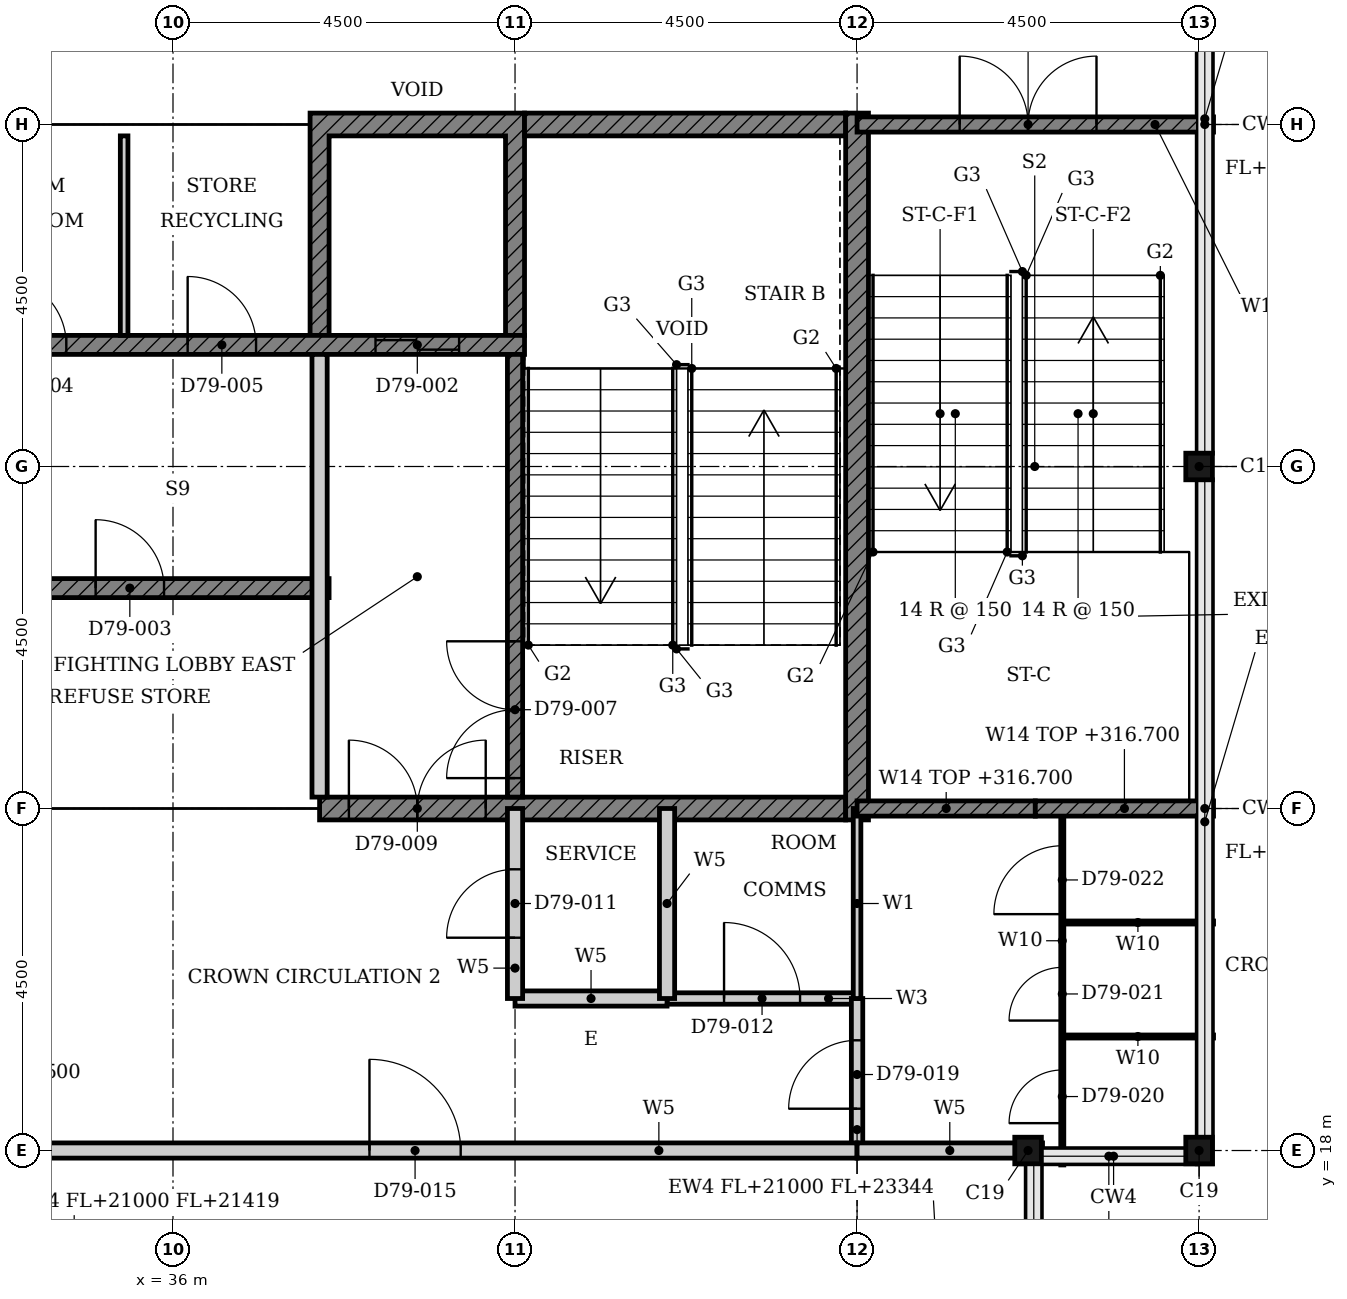
"""IFC4 building model, lengths in metres.
Left out: names, types, materials, properties, quantities, classifications, styles, units other than length and angle.
Written with IfcOpenShell. Run it as: python <this file> out.ifc"""

import sys

from ifc_helpers import new_model, si_unit, direction, frame, frame_2d, origin, origin_2d, place, context, subcontext, project, spatial, polyline, rectangle, i_section, outline, extrude, element, fill, save


model = new_model("IFC4")
c1 = context("Model", 3, precision=1e-05, world=origin(), true_north=direction((0.0, 1.0)))
c2 = subcontext(c1, "Body", "Model", "MODEL_VIEW")
j1 = project(units=[si_unit("LENGTHUNIT", "METRE"), si_unit("PLANEANGLEUNIT", "RADIAN")], contexts=[c1])
p1 = place(None, origin())
s1 = spatial("IfcSite", under=j1, at=p1, CompositionType="ELEMENT")
p2 = place(p1, origin())
s2 = spatial("IfcBuilding", under=s1, at=p2, CompositionType="ELEMENT")
p3 = place(p2, frame((0.0, 0.0, 312.8)))
s3 = spatial("IfcBuildingStorey", under=s2, at=p3, CompositionType="ELEMENT", Elevation=312.8)
for number, where, z_axis, x_axis in (
    (1, (47.25, 18.0, 0.0), (0.0, 0.0, 1.0), (1.0, 0.0, 0.0)),
    (2, (49.5, 18.0, 0.0), (0.0, 0.0, 1.0), (1.0, 0.0, 0.0)),
    (3, (49.5, 27.0, 0.0), (0.0, 0.0, 1.0), (1.0, 0.0, 0.0)),
):
    element("IfcColumn", number, at=place(p3, frame(where, z_axis=z_axis, x_axis=x_axis)), inside=s3, PredefinedType="COLUMN", context=c2, shape_type="SweptSolid", body=[
        extrude(i_section(OverallWidth=0.35, OverallDepth=0.35, WebThickness=0.012, FlangeThickness=0.019, FilletRadius=0.013, at=origin_2d()), origin(), (0.0, 0.0, 1.0), 4.2),
    ])
p4 = place(p3, frame((47.325, 15.575, 21.0), z_axis=(0.0, 0.0, 1.0), x_axis=(0.0, 1.0, 0.0)))
e4 = element("IfcWall", 4, at=p4, inside=s3, PredefinedType="SOLIDWALL", context=c2, shape_type="SweptSolid", body=[
    extrude(rectangle(XDim=2.25, YDim=0.2, at=frame_2d((1.125, 0.0))), origin(), (0.0, 0.0, 1.0), 2.864),
])
p5 = place(p3, frame((47.15, 17.925, 21.0), z_axis=(0.0, 0.0, 1.0), x_axis=(1.0, 0.0, 0.0)))
e5 = element("IfcWall", 5, at=p5, inside=s3, PredefinedType="SOLIDWALL", context=c2, shape_type="SweptSolid", body=[
    extrude(rectangle(XDim=2.325, YDim=0.2, at=frame_2d((1.163, 0.0))), origin(), (0.0, 0.0, 1.0), 2.806),
])
p6 = place(p3, frame((49.575, 17.825, 21.0), z_axis=(0.0, 0.0, 1.0), x_axis=(0.0, 1.0, 0.0)))
e6 = element("IfcWall", 6, at=p6, inside=s3, PredefinedType="SOLIDWALL", context=c2, shape_type="SweptSolid", body=[
    extrude(rectangle(XDim=9.0, YDim=0.2, at=frame_2d((4.5, 0.0))), origin(), (0.0, 0.0, 1.0), 3.342),
])
p7 = place(p3, frame((49.575, 27.175, 21.0), z_axis=(0.0, 0.0, 1.0), x_axis=(0.0, 1.0, 0.0)))
e7 = element("IfcWall", 7, at=p7, inside=s3, PredefinedType="SOLIDWALL", context=c2, shape_type="SweptSolid", body=[
    extrude(rectangle(XDim=8.8, YDim=0.2, at=frame_2d((4.4, 0.0))), origin(), (0.0, 0.0, 1.0), 3.342),
])
p8 = place(p3, origin())
e8 = element("IfcWall", 8, at=p8, inside=s3, PredefinedType="SHEAR", context=c2, shape_type="SweptSolid", body=[
    extrude(outline(polyline([(37.803, 28.725), (38.053, 28.725), (38.053, 31.35), (40.375, 31.35), (40.375, 28.725), (40.625, 28.725), (40.625, 31.65), (37.803, 31.65), (37.803, 28.725)])), origin(), (0.0, 0.0, 1.0), 3.9),
])
p9 = place(p3, frame((37.928, 22.5, 0.0), z_axis=(0.0, 0.0, 1.0), x_axis=(1.0, 0.0, 0.0)))
e9 = element("IfcWall", 9, at=p9, inside=s3, PredefinedType="SHEAR", context=c2, shape_type="SweptSolid", body=[
    extrude(rectangle(XDim=6.922, YDim=0.3, at=frame_2d((3.461, 0.0))), origin(), (0.0, 0.0, 1.0), 3.1),
])
p10 = place(p9, frame((0.386, 0.0, 0.0)))
e10 = element("IfcOpeningElement", 10, at=p10, cuts=e9, PredefinedType="OPENING", context=c2, shape_type="SweptSolid", body=[
    extrude(rectangle(XDim=1.8, YDim=2.1, at=frame_2d((0.9, 1.05))), frame((0.0, 0.16, 0.0), z_axis=(0.0, -1.0, 0.0), x_axis=(1.0, 0.0, 0.0)), (0.0, 0.0, 1.0), 0.32),
])
p11 = place(p3, frame((40.625, 31.5, 0.0), z_axis=(0.0, 0.0, 1.0), x_axis=(1.0, 0.0, 0.0)))
e11 = element("IfcWall", 11, at=p11, inside=s3, PredefinedType="SHEAR", context=c2, shape_type="SweptSolid", body=[
    extrude(rectangle(XDim=4.225, YDim=0.3, at=frame_2d((2.113, 0.0))), origin(), (0.0, 0.0, 1.0), 3.1),
])
p12 = place(p3, frame((45.0, 22.35, 0.0), z_axis=(0.0, 0.0, 1.0), x_axis=(0.0, 1.0, 0.0)))
e12 = element("IfcWall", 12, at=p12, inside=s3, PredefinedType="SHEAR", context=c2, shape_type="SweptSolid", body=[
    extrude(rectangle(XDim=9.3, YDim=0.3, at=frame_2d((4.65, 0.0))), origin(), (0.0, 0.0, 1.0), 3.9),
])
p13 = place(p3, frame((32.811, 25.4, 0.0), z_axis=(0.0, 0.0, 1.0), x_axis=(1.0, 0.0, 0.0)))
e13 = element("IfcWall", 13, at=p13, inside=s3, PredefinedType="SHEAR", context=c2, shape_type="SweptSolid", body=[
    extrude(rectangle(XDim=5.243, YDim=0.25, at=frame_2d((2.621, 0.0))), origin(), (0.0, 0.0, 1.0), 3.9),
])
p14 = place(p13, frame((2.171, 0.0, 0.0)))
e14 = element("IfcOpeningElement", 14, at=p14, cuts=e13, PredefinedType="OPENING", context=c2, shape_type="SweptSolid", body=[
    extrude(rectangle(XDim=0.9, YDim=2.1, at=frame_2d((0.45, 1.05))), frame((0.0, 0.135, 0.0), z_axis=(0.0, -1.0, 0.0), x_axis=(1.0, 0.0, 0.0)), (0.0, 0.0, 1.0), 0.27),
])
p15 = place(p3, frame((32.811, 28.6, 0.0), z_axis=(0.0, 0.0, 1.0), x_axis=(1.0, 0.0, 0.0)))
e15 = element("IfcWall", 15, at=p15, inside=s3, PredefinedType="SHEAR", context=c2, shape_type="SweptSolid", body=[
    extrude(rectangle(XDim=7.814, YDim=0.25, at=frame_2d((3.907, 0.0))), origin(), (0.0, 0.0, 1.0), 3.9),
])
p16 = place(p15, frame((5.854, 0.0, 0.0)))
e16 = element("IfcOpeningElement", 16, at=p16, cuts=e15, PredefinedType="OPENING", context=c2, shape_type="SweptSolid", body=[
    extrude(rectangle(XDim=1.1, YDim=2.1, at=frame_2d((0.55, 1.05))), frame((0.0, 0.135, 0.0), z_axis=(0.0, -1.0, 0.0), x_axis=(1.0, 0.0, 0.0)), (0.0, 0.0, 1.0), 0.27),
])
p17 = place(p15, frame((0.886, 0.0, 0.0)))
e17 = element("IfcOpeningElement", 17, at=p17, cuts=e15, PredefinedType="OPENING", context=c2, shape_type="SweptSolid", body=[
    extrude(rectangle(XDim=0.9, YDim=2.1, at=frame_2d((0.45, 1.05))), frame((0.0, 0.135, 0.0), z_axis=(0.0, -1.0, 0.0), x_axis=(1.0, 0.0, 0.0)), (0.0, 0.0, 1.0), 0.27),
])
p18 = place(p15, frame((3.382, 0.0, 0.0)))
e18 = element("IfcOpeningElement", 18, at=p18, cuts=e15, PredefinedType="OPENING", context=c2, shape_type="SweptSolid", body=[
    extrude(rectangle(XDim=0.9, YDim=2.1, at=frame_2d((0.45, 1.05))), frame((0.0, 0.135, 0.0), z_axis=(0.0, -1.0, 0.0), x_axis=(1.0, 0.0, 0.0)), (0.0, 0.0, 1.0), 0.27),
])
p19 = place(p3, frame((35.357, 28.725, 0.0), z_axis=(0.0, 0.0, 1.0), x_axis=(0.0, 1.0, 0.0)))
e19 = element("IfcWall", 19, at=p19, inside=s3, PredefinedType="PARTITIONING", context=c2, shape_type="SweptSolid", body=[
    extrude(rectangle(XDim=2.625, YDim=0.1, at=frame_2d((1.312, 0.0))), origin(), (0.0, 0.0, 1.0), 3.9),
])
p20 = place(p3, frame((40.5, 22.65, 0.0), z_axis=(0.0, 0.0, 1.0), x_axis=(0.0, 1.0, 0.0)))
e20 = element("IfcWall", 20, at=p20, inside=s3, PredefinedType="SHEAR", context=c2, shape_type="SweptSolid", body=[
    extrude(rectangle(XDim=5.825, YDim=0.2, at=frame_2d((2.913, 0.0))), origin(), (0.0, 0.0, 1.0), 3.9),
])
p21 = place(p20, frame((0.25, 0.0, 0.0)))
e21 = element("IfcOpeningElement", 21, at=p21, cuts=e20, PredefinedType="OPENING", context=c2, shape_type="SweptSolid", body=[
    extrude(rectangle(XDim=1.8, YDim=2.1, at=frame_2d((0.9, 1.05))), frame((0.0, 0.11, 0.0), z_axis=(0.0, -1.0, 0.0), x_axis=(1.0, 0.0, 0.0)), (0.0, 0.0, 1.0), 0.22),
])
p22 = place(p3, frame((37.928, 22.65, 0.0), z_axis=(0.0, 0.0, 1.0), x_axis=(0.0, 1.0, 0.0)))
e22 = element("IfcWall", 22, at=p22, inside=s3, PredefinedType="PARTITIONING", context=c2, shape_type="SweptSolid", body=[
    extrude(rectangle(XDim=5.825, YDim=0.2, at=frame_2d((2.913, 0.0))), origin(), (0.0, 0.0, 1.0), 3.9),
])
p23 = place(p3, frame((42.5, 20.0, 0.0), z_axis=(0.0, 0.0, 1.0), x_axis=(1.0, 0.0, 0.0)))
e23 = element("IfcWall", 23, at=p23, inside=s3, PredefinedType="PARTITIONING", context=c2, shape_type="SweptSolid", body=[
    extrude(rectangle(XDim=2.5, YDim=0.15, at=frame_2d((1.25, 0.0))), origin(), (0.0, 0.0, 1.0), 3.9),
])
p24 = place(p23, frame((0.75, 0.0, 0.0)))
e24 = element("IfcOpeningElement", 24, at=p24, cuts=e23, PredefinedType="OPENING", context=c2, shape_type="SweptSolid", body=[
    extrude(rectangle(XDim=1.0, YDim=2.1, at=frame_2d((0.5, 1.05))), frame((0.0, 0.085, 0.0), z_axis=(0.0, -1.0, 0.0), x_axis=(1.0, 0.0, 0.0)), (0.0, 0.0, 1.0), 0.17),
])
p25 = place(p3, frame((45.0, 18.0, 0.0), z_axis=(0.0, 0.0, 1.0), x_axis=(0.0, 1.0, 0.0)))
e25 = element("IfcWall", 25, at=p25, inside=s3, PredefinedType="PARTITIONING", context=c2, shape_type="SweptSolid", body=[
    extrude(rectangle(XDim=2.0, YDim=0.15, at=frame_2d((1.0, 0.0))), origin(), (0.0, 0.0, 1.0), 3.9),
])
p26 = place(p25, frame((0.55, 0.0, 0.0)))
e26 = element("IfcOpeningElement", 26, at=p26, cuts=e25, PredefinedType="OPENING", context=c2, shape_type="SweptSolid", body=[
    extrude(rectangle(XDim=0.9, YDim=2.1, at=frame_2d((0.45, 1.05))), frame((0.0, 0.085, 0.0), z_axis=(0.0, -1.0, 0.0), x_axis=(1.0, 0.0, 0.0)), (0.0, 0.0, 1.0), 0.17),
])
p27 = place(p3, frame((45.0, 20.0, 0.0), z_axis=(0.0, 0.0, 1.0), x_axis=(0.0, 1.0, 0.0)))
e27 = element("IfcWall", 27, at=p27, inside=s3, PredefinedType="PARTITIONING", context=c2, shape_type="SweptSolid", body=[
    extrude(rectangle(XDim=2.5, YDim=0.1, at=frame_2d((1.25, 0.0))), origin(), (0.0, 0.0, 1.0), 3.9),
])
p28 = place(p3, frame((33.56, 18.0, 0.0), z_axis=(0.0, 0.0, 1.0), x_axis=(1.0, 0.0, 0.0)))
e28 = element("IfcWall", 28, at=p28, inside=s3, PredefinedType="PARTITIONING", context=c2, shape_type="SweptSolid", body=[
    extrude(rectangle(XDim=11.44, YDim=0.2, at=frame_2d((5.72, 0.0))), origin(), (0.0, 0.0, 1.0), 3.08),
])
p29 = place(p28, frame((5.025, 0.0, 0.0)))
e29 = element("IfcOpeningElement", 29, at=p29, cuts=e28, PredefinedType="OPENING", context=c2, shape_type="SweptSolid", body=[
    extrude(rectangle(XDim=1.2, YDim=2.1, at=frame_2d((0.6, 1.05))), frame((0.0, 0.11, 0.0), z_axis=(0.0, -1.0, 0.0), x_axis=(1.0, 0.0, 0.0)), (0.0, 0.0, 1.0), 0.22),
])
p30 = place(p3, frame((45.0, 18.0, 0.0), z_axis=(0.0, 0.0, 1.0), x_axis=(1.0, 0.0, 0.0)))
e30 = element("IfcWall", 30, at=p30, inside=s3, PredefinedType="PARTITIONING", context=c2, shape_type="SweptSolid", body=[
    extrude(rectangle(XDim=2.44, YDim=0.2, at=frame_2d((1.22, 0.0))), origin(), (0.0, 0.0, 1.0), 3.08),
])
p31 = place(p3, frame((40.5, 20.0, 0.0), z_axis=(0.0, 0.0, 1.0), x_axis=(1.0, 0.0, 0.0)))
e31 = element("IfcWall", 31, at=p31, inside=s3, PredefinedType="PARTITIONING", context=c2, shape_type="SweptSolid", body=[
    extrude(rectangle(XDim=2.0, YDim=0.2, at=frame_2d((1.0, 0.0))), origin(), (0.0, 0.0, 1.0), 3.9),
])
p32 = place(p3, frame((40.5, 20.0, 0.0), z_axis=(0.0, 0.0, 1.0), x_axis=(0.0, 1.0, 0.0)))
e32 = element("IfcWall", 32, at=p32, inside=s3, PredefinedType="PARTITIONING", context=c2, shape_type="SweptSolid", body=[
    extrude(rectangle(XDim=2.5, YDim=0.2, at=frame_2d((1.25, 0.0))), origin(), (0.0, 0.0, 1.0), 3.9),
])
p33 = place(p32, frame((0.8, 0.0, 0.0)))
e33 = element("IfcOpeningElement", 33, at=p33, cuts=e32, PredefinedType="OPENING", context=c2, shape_type="SweptSolid", body=[
    extrude(rectangle(XDim=0.9, YDim=2.1, at=frame_2d((0.45, 1.05))), frame((0.0, 0.11, 0.0), z_axis=(0.0, -1.0, 0.0), x_axis=(1.0, 0.0, 0.0)), (0.0, 0.0, 1.0), 0.22),
])
p34 = place(p3, frame((42.5, 20.0, 0.0), z_axis=(0.0, 0.0, 1.0), x_axis=(0.0, 1.0, 0.0)))
e34 = element("IfcWall", 34, at=p34, inside=s3, PredefinedType="PARTITIONING", context=c2, shape_type="SweptSolid", body=[
    extrude(rectangle(XDim=2.5, YDim=0.2, at=frame_2d((1.25, 0.0))), origin(), (0.0, 0.0, 1.0), 3.9),
])
p35 = place(p3, frame((45.0, 22.5, 0.0), z_axis=(0.0, 0.0, 1.0), x_axis=(1.0, 0.0, 0.0)))
e35 = element("IfcWall", 35, at=p35, inside=s3, PredefinedType="SHEAR", context=c2, shape_type="SweptSolid", body=[
    extrude(rectangle(XDim=2.345, YDim=0.2, at=frame_2d((1.172, 0.0))), origin(), (0.0, 0.0, 1.0), 3.9),
])
p36 = place(p3, frame((45.0, 31.5, 0.0), z_axis=(0.0, 0.0, 1.0), x_axis=(1.0, 0.0, 0.0)))
e36 = element("IfcWall", 36, at=p36, inside=s3, PredefinedType="SHEAR", context=c2, shape_type="SweptSolid", body=[
    extrude(rectangle(XDim=4.69, YDim=0.2, at=frame_2d((2.345, 0.0))), origin(), (0.0, 0.0, 1.0), 3.9),
])
p37 = place(p36, frame((1.35, 0.0, 0.0)))
e37 = element("IfcOpeningElement", 37, at=p37, cuts=e36, PredefinedType="OPENING", context=c2, shape_type="SweptSolid", body=[
    extrude(rectangle(XDim=1.8, YDim=2.1, at=frame_2d((0.9, 1.05))), frame((0.0, 0.11, 0.0), z_axis=(0.0, -1.0, 0.0), x_axis=(1.0, 0.0, 0.0)), (0.0, 0.0, 1.0), 0.22),
])
for number, where, z_axis, x_axis in (
    (38, (49.69, 19.5, 0.0), (0.0, 0.0, 1.0), (-1.0, 0.0, 0.0)),
    (39, (49.69, 21.0, 0.0), (0.0, 0.0, 1.0), (-1.0, 0.0, 0.0)),
):
    element("IfcWall", number, at=place(p3, frame(where, z_axis=z_axis, x_axis=x_axis)), inside=s3, PredefinedType="PARTITIONING", context=c2, shape_type="SweptSolid", body=[
        extrude(rectangle(XDim=1.99, YDim=0.04, at=frame_2d((0.995, 0.0))), origin(), (0.0, 0.0, 1.0), 3.9),
    ])
p38 = place(p3, frame((47.7, 17.81, 0.0), z_axis=(0.0, 0.0, 1.0), x_axis=(0.0, 1.0, 0.0)))
e40 = element("IfcWall", 40, at=p38, inside=s3, PredefinedType="PARTITIONING", context=c2, shape_type="SweptSolid", body=[
    extrude(rectangle(XDim=4.69, YDim=0.04, at=frame_2d((2.345, 0.0))), origin(), (0.0, 0.0, 1.0), 3.9),
])
p39 = place(p38, frame((0.55, 0.0, 0.0)))
e41 = element("IfcOpeningElement", 41, at=p39, cuts=e40, PredefinedType="OPENING", context=c2, shape_type="SweptSolid", body=[
    extrude(rectangle(XDim=0.7, YDim=2.0, at=frame_2d((0.35, 1.0))), frame((0.0, 0.03, 0.0), z_axis=(0.0, -1.0, 0.0), x_axis=(1.0, 0.0, 0.0)), (0.0, 0.0, 1.0), 0.06),
])
p40 = place(p38, frame((1.9, 0.0, 0.0)))
e42 = element("IfcOpeningElement", 42, at=p40, cuts=e40, PredefinedType="OPENING", context=c2, shape_type="SweptSolid", body=[
    extrude(rectangle(XDim=0.7, YDim=2.0, at=frame_2d((0.35, 1.0))), frame((0.0, 0.03, 0.0), z_axis=(0.0, -1.0, 0.0), x_axis=(1.0, 0.0, 0.0)), (0.0, 0.0, 1.0), 0.06),
])
p41 = place(p38, frame((3.3, 0.0, 0.0)))
e43 = element("IfcOpeningElement", 43, at=p41, cuts=e40, PredefinedType="OPENING", context=c2, shape_type="SweptSolid", body=[
    extrude(rectangle(XDim=0.9, YDim=2.0, at=frame_2d((0.45, 1.0))), frame((0.0, 0.03, 0.0), z_axis=(0.0, -1.0, 0.0), x_axis=(1.0, 0.0, 0.0)), (0.0, 0.0, 1.0), 0.06),
])
p42 = place(p3, frame((47.345, 22.5, 0.0), z_axis=(0.0, 0.0, 1.0), x_axis=(1.0, 0.0, 0.0)))
e44 = element("IfcWall", 44, at=p42, inside=s3, PredefinedType="SHEAR", context=c2, shape_type="SweptSolid", body=[
    extrude(rectangle(XDim=2.345, YDim=0.2, at=frame_2d((1.172, 0.0))), origin(), (0.0, 0.0, 1.0), 3.9),
])
p43 = place(p16, origin())
e45 = element("IfcDoor", 45, at=p43, inside=s3, OperationType="DOUBLE_DOOR_SLIDING", PredefinedType="DOOR", context=c2, shape_type="SweptSolid", body=[
    extrude(rectangle(XDim=1.1, YDim=2.1, at=frame_2d((0.55, 1.05))), frame((0.0, 0.025, 0.0), z_axis=(0.0, -1.0, 0.0), x_axis=(1.0, 0.0, 0.0)), (0.0, 0.0, 1.0), 0.05),
])
fill(e16, e45)
p44 = place(p14, origin())
e46 = element("IfcDoor", 46, at=p44, inside=s3, OperationType="SINGLE_SWING_LEFT", PredefinedType="DOOR", context=c2, shape_type="SweptSolid", body=[
    extrude(rectangle(XDim=0.9, YDim=2.1, at=frame_2d((0.45, 1.05))), frame((0.0, 0.025, 0.0), z_axis=(0.0, -1.0, 0.0), x_axis=(1.0, 0.0, 0.0)), (0.0, 0.0, 1.0), 0.05),
])
fill(e14, e46)
p45 = place(p17, origin())
e47 = element("IfcDoor", 47, at=p45, inside=s3, OperationType="SINGLE_SWING_LEFT", PredefinedType="DOOR", context=c2, shape_type="SweptSolid", body=[
    extrude(rectangle(XDim=0.9, YDim=2.1, at=frame_2d((0.45, 1.05))), frame((0.0, 0.025, 0.0), z_axis=(0.0, -1.0, 0.0), x_axis=(1.0, 0.0, 0.0)), (0.0, 0.0, 1.0), 0.05),
])
fill(e17, e47)
p46 = place(p18, origin())
e48 = element("IfcDoor", 48, at=p46, inside=s3, OperationType="SINGLE_SWING_LEFT", PredefinedType="DOOR", context=c2, shape_type="SweptSolid", body=[
    extrude(rectangle(XDim=0.9, YDim=2.1, at=frame_2d((0.45, 1.05))), frame((0.0, 0.025, 0.0), z_axis=(0.0, -1.0, 0.0), x_axis=(1.0, 0.0, 0.0)), (0.0, 0.0, 1.0), 0.05),
])
fill(e18, e48)
p47 = place(p21, origin())
e49 = element("IfcDoor", 49, at=p47, inside=s3, OperationType="DOUBLE_DOOR_SINGLE_SWING", PredefinedType="DOOR", context=c2, shape_type="SweptSolid", body=[
    extrude(rectangle(XDim=1.8, YDim=2.1, at=frame_2d((0.9, 1.05))), frame((0.0, 0.025, 0.0), z_axis=(0.0, -1.0, 0.0), x_axis=(1.0, 0.0, 0.0)), (0.0, 0.0, 1.0), 0.05),
])
fill(e21, e49)
p48 = place(p10, origin())
e50 = element("IfcDoor", 50, at=p48, inside=s3, OperationType="DOUBLE_DOOR_SINGLE_SWING", PredefinedType="DOOR", context=c2, shape_type="SweptSolid", body=[
    extrude(rectangle(XDim=1.8, YDim=2.1, at=frame_2d((0.9, 1.05))), frame((0.0, 0.025, 0.0), z_axis=(0.0, -1.0, 0.0), x_axis=(1.0, 0.0, 0.0)), (0.0, 0.0, 1.0), 0.05),
])
fill(e10, e50)
p49 = place(p37, origin())
e51 = element("IfcDoor", 51, at=p49, inside=s3, OperationType="DOUBLE_DOOR_SINGLE_SWING", PredefinedType="DOOR", context=c2, shape_type="SweptSolid", body=[
    extrude(rectangle(XDim=1.8, YDim=2.1, at=frame_2d((0.9, 1.05))), frame((0.0, 0.025, 0.0), z_axis=(0.0, -1.0, 0.0), x_axis=(1.0, 0.0, 0.0)), (0.0, 0.0, 1.0), 0.05),
])
fill(e37, e51)
p50 = place(p33, origin())
e52 = element("IfcDoor", 52, at=p50, inside=s3, OperationType="SINGLE_SWING_RIGHT", PredefinedType="DOOR", context=c2, shape_type="SweptSolid", body=[
    extrude(rectangle(XDim=0.9, YDim=2.1, at=frame_2d((0.45, 1.05))), frame((0.0, 0.025, 0.0), z_axis=(0.0, -1.0, 0.0), x_axis=(1.0, 0.0, 0.0)), (0.0, 0.0, 1.0), 0.05),
])
fill(e33, e52)
p51 = place(p24, origin())
e53 = element("IfcDoor", 53, at=p51, inside=s3, OperationType="SINGLE_SWING_RIGHT", PredefinedType="DOOR", context=c2, shape_type="SweptSolid", body=[
    extrude(rectangle(XDim=1.0, YDim=2.1, at=frame_2d((0.5, 1.05))), frame((0.0, 0.025, 0.0), z_axis=(0.0, -1.0, 0.0), x_axis=(1.0, 0.0, 0.0)), (0.0, 0.0, 1.0), 0.05),
])
fill(e24, e53)
p52 = place(p29, origin())
e54 = element("IfcDoor", 54, at=p52, inside=s3, OperationType="SINGLE_SWING_LEFT", PredefinedType="DOOR", context=c2, shape_type="SweptSolid", body=[
    extrude(rectangle(XDim=1.2, YDim=2.1, at=frame_2d((0.6, 1.05))), frame((0.0, 0.025, 0.0), z_axis=(0.0, -1.0, 0.0), x_axis=(1.0, 0.0, 0.0)), (0.0, 0.0, 1.0), 0.05),
])
fill(e29, e54)
p53 = place(p26, origin())
e55 = element("IfcDoor", 55, at=p53, inside=s3, OperationType="SINGLE_SWING_RIGHT", PredefinedType="DOOR", context=c2, shape_type="SweptSolid", body=[
    extrude(rectangle(XDim=0.9, YDim=2.1, at=frame_2d((0.45, 1.05))), frame((0.0, 0.025, 0.0), z_axis=(0.0, -1.0, 0.0), x_axis=(1.0, 0.0, 0.0)), (0.0, 0.0, 1.0), 0.05),
])
fill(e26, e55)
p54 = place(p39, origin())
e56 = element("IfcDoor", 56, at=p54, inside=s3, OperationType="SINGLE_SWING_LEFT", PredefinedType="DOOR", context=c2, shape_type="SweptSolid", body=[
    extrude(rectangle(XDim=0.7, YDim=2.0, at=frame_2d((0.35, 1.0))), frame((0.0, 0.02, 0.0), z_axis=(0.0, -1.0, 0.0), x_axis=(1.0, 0.0, 0.0)), (0.0, 0.0, 1.0), 0.04),
])
fill(e41, e56)
p55 = place(p40, origin())
e57 = element("IfcDoor", 57, at=p55, inside=s3, OperationType="SINGLE_SWING_RIGHT", PredefinedType="DOOR", context=c2, shape_type="SweptSolid", body=[
    extrude(rectangle(XDim=0.7, YDim=2.0, at=frame_2d((0.35, 1.0))), frame((0.0, 0.02, 0.0), z_axis=(0.0, -1.0, 0.0), x_axis=(1.0, 0.0, 0.0)), (0.0, 0.0, 1.0), 0.04),
])
fill(e42, e57)
p56 = place(p41, origin())
e58 = element("IfcDoor", 58, at=p56, inside=s3, OperationType="SINGLE_SWING_RIGHT", PredefinedType="DOOR", context=c2, shape_type="SweptSolid", body=[
    extrude(rectangle(XDim=0.9, YDim=2.0, at=frame_2d((0.45, 1.0))), frame((0.0, 0.02, 0.0), z_axis=(0.0, -1.0, 0.0), x_axis=(1.0, 0.0, 0.0)), (0.0, 0.0, 1.0), 0.04),
])
fill(e43, e58)
save(model, sys.argv[1])
